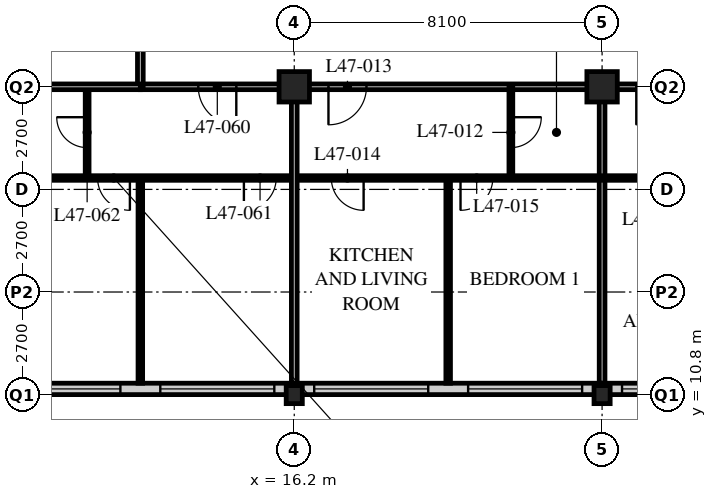
"""IFC4 building model, lengths in metres.
Left out: names, types, materials, properties, quantities, classifications, styles, units other than length and angle.
Written with IfcOpenShell. Run it as: python <this file> out.ifc"""

import sys

from ifc_helpers import new_model, si_unit, direction, frame, frame_2d, origin, origin_2d, place, context, subcontext, project, spatial, rectangle, hollow_rectangle, i_section, extrude, element, fill, save


model = new_model("IFC4")
c1 = context("Model", 3, precision=1e-05, world=origin(), true_north=direction((0.0, 1.0)))
c2 = subcontext(c1, "Body", "Model", "MODEL_VIEW")
j1 = project(units=[si_unit("LENGTHUNIT", "METRE"), si_unit("PLANEANGLEUNIT", "RADIAN")], contexts=[c1])
p1 = place(None, origin())
s1 = spatial("IfcSite", under=j1, at=p1, CompositionType="ELEMENT")
p2 = place(p1, origin())
s2 = spatial("IfcBuilding", under=s1, at=p2, CompositionType="ELEMENT")
p3 = place(p2, frame((0.0, 0.0, 184.8)))
s3 = spatial("IfcBuildingStorey", under=s2, at=p3, CompositionType="ELEMENT", Elevation=184.8)
p4 = place(p3, frame((16.2, 10.8, 0.0), z_axis=(0.0, 0.0, 1.0), x_axis=(1.0, 0.0, 0.0)))
e1 = element("IfcColumn", 1, at=p4, inside=s3, PredefinedType="COLUMN", context=c2, shape_type="SweptSolid", body=[
    extrude(i_section(OverallWidth=0.424, OverallDepth=0.475, WebThickness=0.048, FlangeThickness=0.077, FilletRadius=0.015, at=origin_2d()), origin(), (0.0, 0.0, 1.0), 3.6),
])
p5 = place(p3, frame((16.2, 18.9, 0.0), z_axis=(0.0, 0.0, 1.0), x_axis=(1.0, 0.0, 0.0)))
e2 = element("IfcColumn", 2, at=p5, inside=s3, PredefinedType="COLUMN", context=c2, shape_type="SweptSolid", body=[
    extrude(hollow_rectangle(XDim=0.8, YDim=0.8, WallThickness=0.08, at=origin_2d()), origin(), (0.0, 0.0, 1.0), 3.6),
])
p6 = place(p3, frame((24.3, 10.8, 0.0), z_axis=(0.0, 0.0, 1.0), x_axis=(1.0, 0.0, 0.0)))
e3 = element("IfcColumn", 3, at=p6, inside=s3, PredefinedType="COLUMN", context=c2, shape_type="SweptSolid", body=[
    extrude(i_section(OverallWidth=0.424, OverallDepth=0.475, WebThickness=0.048, FlangeThickness=0.077, FilletRadius=0.015, at=origin_2d()), origin(), (0.0, 0.0, 1.0), 3.6),
])
p7 = place(p3, frame((24.3, 18.9, 0.0), z_axis=(0.0, 0.0, 1.0), x_axis=(1.0, 0.0, 0.0)))
e4 = element("IfcColumn", 4, at=p7, inside=s3, PredefinedType="COLUMN", context=c2, shape_type="SweptSolid", body=[
    extrude(hollow_rectangle(XDim=0.8, YDim=0.8, WallThickness=0.08, at=origin_2d()), origin(), (0.0, 0.0, 1.0), 3.6),
])
p8 = place(p3, frame((8.4, 10.95, 0.0), z_axis=(0.0, 0.0, 1.0), x_axis=(1.0, 0.0, 0.0)))
e5 = element("IfcWall", 5, at=p8, inside=s3, PredefinedType="SOLIDWALL", context=c2, shape_type="SweptSolid", body=[
    extrude(rectangle(XDim=40.2, YDim=0.3, at=frame_2d((20.1, 0.0))), origin(), (0.0, 0.0, 1.0), 3.39),
])
p9 = place(p8, frame((0.225, 0.0, 0.6)))
e6 = element("IfcOpeningElement", 6, at=p9, cuts=e5, PredefinedType="OPENING", context=c2, shape_type="SweptSolid", body=[
    extrude(rectangle(XDim=3.0, YDim=2.4, at=frame_2d((1.5, 1.2))), frame((0.0, 0.16, 0.0), z_axis=(0.0, -1.0, 0.0), x_axis=(1.0, 0.0, 0.0)), (0.0, 0.0, 1.0), 0.32),
])
p10 = place(p8, frame((4.275, 0.0, 0.6)))
e7 = element("IfcOpeningElement", 7, at=p10, cuts=e5, PredefinedType="OPENING", context=c2, shape_type="SweptSolid", body=[
    extrude(rectangle(XDim=3.0, YDim=2.4, at=frame_2d((1.5, 1.2))), frame((0.0, 0.16, 0.0), z_axis=(0.0, -1.0, 0.0), x_axis=(1.0, 0.0, 0.0)), (0.0, 0.0, 1.0), 0.32),
])
p11 = place(p8, frame((8.325, 0.0, 0.6)))
e8 = element("IfcOpeningElement", 8, at=p11, cuts=e5, PredefinedType="OPENING", context=c2, shape_type="SweptSolid", body=[
    extrude(rectangle(XDim=3.0, YDim=2.4, at=frame_2d((1.5, 1.2))), frame((0.0, 0.16, 0.0), z_axis=(0.0, -1.0, 0.0), x_axis=(1.0, 0.0, 0.0)), (0.0, 0.0, 1.0), 0.32),
])
p12 = place(p8, frame((12.375, 0.0, 0.6)))
e9 = element("IfcOpeningElement", 9, at=p12, cuts=e5, PredefinedType="OPENING", context=c2, shape_type="SweptSolid", body=[
    extrude(rectangle(XDim=3.0, YDim=2.4, at=frame_2d((1.5, 1.2))), frame((0.0, 0.16, 0.0), z_axis=(0.0, -1.0, 0.0), x_axis=(1.0, 0.0, 0.0)), (0.0, 0.0, 1.0), 0.32),
])
p13 = place(p8, frame((16.425, 0.0, 0.6)))
e10 = element("IfcOpeningElement", 10, at=p13, cuts=e5, PredefinedType="OPENING", context=c2, shape_type="SweptSolid", body=[
    extrude(rectangle(XDim=3.0, YDim=2.4, at=frame_2d((1.5, 1.2))), frame((0.0, 0.16, 0.0), z_axis=(0.0, -1.0, 0.0), x_axis=(1.0, 0.0, 0.0)), (0.0, 0.0, 1.0), 0.32),
])
p14 = place(p8, frame((20.475, 0.0, 0.6)))
e11 = element("IfcOpeningElement", 11, at=p14, cuts=e5, PredefinedType="OPENING", context=c2, shape_type="SweptSolid", body=[
    extrude(rectangle(XDim=3.0, YDim=2.4, at=frame_2d((1.5, 1.2))), frame((0.0, 0.16, 0.0), z_axis=(0.0, -1.0, 0.0), x_axis=(1.0, 0.0, 0.0)), (0.0, 0.0, 1.0), 0.32),
])
p15 = place(p8, frame((24.525, 0.0, 0.6)))
e12 = element("IfcOpeningElement", 12, at=p15, cuts=e5, PredefinedType="OPENING", context=c2, shape_type="SweptSolid", body=[
    extrude(rectangle(XDim=3.0, YDim=2.4, at=frame_2d((1.5, 1.2))), frame((0.0, 0.16, 0.0), z_axis=(0.0, -1.0, 0.0), x_axis=(1.0, 0.0, 0.0)), (0.0, 0.0, 1.0), 0.32),
])
p16 = place(p8, frame((28.575, 0.0, 0.6)))
e13 = element("IfcOpeningElement", 13, at=p16, cuts=e5, PredefinedType="OPENING", context=c2, shape_type="SweptSolid", body=[
    extrude(rectangle(XDim=3.0, YDim=2.4, at=frame_2d((1.5, 1.2))), frame((0.0, 0.16, 0.0), z_axis=(0.0, -1.0, 0.0), x_axis=(1.0, 0.0, 0.0)), (0.0, 0.0, 1.0), 0.32),
])
p17 = place(p8, frame((32.625, 0.0, 0.6)))
e14 = element("IfcOpeningElement", 14, at=p17, cuts=e5, PredefinedType="OPENING", context=c2, shape_type="SweptSolid", body=[
    extrude(rectangle(XDim=3.0, YDim=2.4, at=frame_2d((1.5, 1.2))), frame((0.0, 0.16, 0.0), z_axis=(0.0, -1.0, 0.0), x_axis=(1.0, 0.0, 0.0)), (0.0, 0.0, 1.0), 0.32),
])
p18 = place(p8, frame((36.675, 0.0, 0.6)))
e15 = element("IfcOpeningElement", 15, at=p18, cuts=e5, PredefinedType="OPENING", context=c2, shape_type="SweptSolid", body=[
    extrude(rectangle(XDim=3.0, YDim=2.4, at=frame_2d((1.5, 1.2))), frame((0.0, 0.16, 0.0), z_axis=(0.0, -1.0, 0.0), x_axis=(1.0, 0.0, 0.0)), (0.0, 0.0, 1.0), 0.32),
])
p19 = place(p3, frame((12.15, 18.9, 0.0), z_axis=(0.0, 0.0, 1.0), x_axis=(1.0, 0.0, 0.0)))
e16 = element("IfcWall", 16, at=p19, inside=s3, PredefinedType="PARTITIONING", context=c2, shape_type="SweptSolid", body=[
    extrude(rectangle(XDim=32.4, YDim=0.15, at=frame_2d((16.2, 0.0))), origin(), (0.0, 0.0, 1.0), 2.778),
])
p20 = place(p19, frame((4.95, 0.0, 0.0)))
e17 = element("IfcOpeningElement", 17, at=p20, cuts=e16, PredefinedType="OPENING", context=c2, shape_type="SweptSolid", body=[
    extrude(rectangle(XDim=1.0, YDim=2.1, at=frame_2d((0.5, 1.05))), frame((0.0, 0.085, 0.0), z_axis=(0.0, -1.0, 0.0), x_axis=(1.0, 0.0, 0.0)), (0.0, 0.0, 1.0), 0.17),
])
p21 = place(p19, frame((13.05, 0.0, 0.0)))
e18 = element("IfcOpeningElement", 18, at=p21, cuts=e16, PredefinedType="OPENING", context=c2, shape_type="SweptSolid", body=[
    extrude(rectangle(XDim=1.0, YDim=2.1, at=frame_2d((0.5, 1.05))), frame((0.0, 0.085, 0.0), z_axis=(0.0, -1.0, 0.0), x_axis=(1.0, 0.0, 0.0)), (0.0, 0.0, 1.0), 0.17),
])
p22 = place(p19, frame((21.15, 0.0, 0.0)))
e19 = element("IfcOpeningElement", 19, at=p22, cuts=e16, PredefinedType="OPENING", context=c2, shape_type="SweptSolid", body=[
    extrude(rectangle(XDim=1.0, YDim=2.1, at=frame_2d((0.5, 1.05))), frame((0.0, 0.085, 0.0), z_axis=(0.0, -1.0, 0.0), x_axis=(1.0, 0.0, 0.0)), (0.0, 0.0, 1.0), 0.17),
])
p23 = place(p19, frame((1.525, 0.0, 0.0)))
e20 = element("IfcOpeningElement", 20, at=p23, cuts=e16, PredefinedType="OPENING", context=c2, shape_type="SweptSolid", body=[
    extrude(rectangle(XDim=1.0, YDim=2.1, at=frame_2d((0.5, 1.05))), frame((0.0, 0.085, 0.0), z_axis=(0.0, -1.0, 0.0), x_axis=(1.0, 0.0, 0.0)), (0.0, 0.0, 1.0), 0.17),
])
p24 = place(p19, frame((29.875, 0.0, 0.0)))
e21 = element("IfcOpeningElement", 21, at=p24, cuts=e16, PredefinedType="OPENING", context=c2, shape_type="SweptSolid", body=[
    extrude(rectangle(XDim=1.0, YDim=2.1, at=frame_2d((0.5, 1.05))), frame((0.0, 0.085, 0.0), z_axis=(0.0, -1.0, 0.0), x_axis=(1.0, 0.0, 0.0)), (0.0, 0.0, 1.0), 0.17),
])
p25 = place(p3, frame((12.15, 18.9, 0.0), z_axis=(0.0, 0.0, 1.0), x_axis=(0.0, 1.0, 0.0)))
e22 = element("IfcWall", 22, at=p25, inside=s3, PredefinedType="PARTITIONING", context=c2, shape_type="SweptSolid", body=[
    extrude(rectangle(XDim=28.35, YDim=0.15, at=frame_2d((14.175, 0.0))), origin(), (0.0, 0.0, 1.0), 3.39),
])
p26 = place(p25, frame((2.35, 0.0, 0.0)))
e23 = element("IfcOpeningElement", 23, at=p26, cuts=e22, PredefinedType="OPENING", context=c2, shape_type="SweptSolid", body=[
    extrude(rectangle(XDim=1.0, YDim=2.1, at=frame_2d((0.5, 1.05))), frame((0.0, 0.085, 0.0), z_axis=(0.0, -1.0, 0.0), x_axis=(1.0, 0.0, 0.0)), (0.0, 0.0, 1.0), 0.17),
])
p27 = place(p25, frame((6.4, 0.0, 0.0)))
e24 = element("IfcOpeningElement", 24, at=p27, cuts=e22, PredefinedType="OPENING", context=c2, shape_type="SweptSolid", body=[
    extrude(rectangle(XDim=1.0, YDim=2.1, at=frame_2d((0.5, 1.05))), frame((0.0, 0.085, 0.0), z_axis=(0.0, -1.0, 0.0), x_axis=(1.0, 0.0, 0.0)), (0.0, 0.0, 1.0), 0.17),
])
p28 = place(p25, frame((8.5, 0.0, 0.0)))
e25 = element("IfcOpeningElement", 25, at=p28, cuts=e22, PredefinedType="OPENING", context=c2, shape_type="SweptSolid", body=[
    extrude(rectangle(XDim=1.0, YDim=2.1, at=frame_2d((0.5, 1.05))), frame((0.0, 0.085, 0.0), z_axis=(0.0, -1.0, 0.0), x_axis=(1.0, 0.0, 0.0)), (0.0, 0.0, 1.0), 0.17),
])
p29 = place(p25, frame((16.6, 0.0, 0.0)))
e26 = element("IfcOpeningElement", 26, at=p29, cuts=e22, PredefinedType="OPENING", context=c2, shape_type="SweptSolid", body=[
    extrude(rectangle(XDim=1.0, YDim=2.1, at=frame_2d((0.5, 1.05))), frame((0.0, 0.085, 0.0), z_axis=(0.0, -1.0, 0.0), x_axis=(1.0, 0.0, 0.0)), (0.0, 0.0, 1.0), 0.17),
])
p30 = place(p25, frame((26.65, 0.0, 0.0)))
e27 = element("IfcOpeningElement", 27, at=p30, cuts=e22, PredefinedType="OPENING", context=c2, shape_type="SweptSolid", body=[
    extrude(rectangle(XDim=1.0, YDim=2.1, at=frame_2d((0.5, 1.05))), frame((0.0, 0.085, 0.0), z_axis=(0.0, -1.0, 0.0), x_axis=(1.0, 0.0, 0.0)), (0.0, 0.0, 1.0), 0.17),
])
p31 = place(p3, frame((21.9, 18.9, 0.0), z_axis=(0.0, 0.0, 1.0), x_axis=(0.0, -1.0, 0.0)))
e28 = element("IfcWall", 28, at=p31, inside=s3, PredefinedType="PARTITIONING", context=c2, shape_type="SweptSolid", body=[
    extrude(rectangle(XDim=2.4, YDim=0.1, at=frame_2d((1.2, 0.0))), origin(), (0.0, 0.0, 1.0), 3.39),
])
p32 = place(p31, frame((0.8, 0.0, 0.0)))
e29 = element("IfcOpeningElement", 29, at=p32, cuts=e28, PredefinedType="OPENING", context=c2, shape_type="SweptSolid", body=[
    extrude(rectangle(XDim=0.8, YDim=2.1, at=frame_2d((0.4, 1.05))), frame((0.0, 0.06, 0.0), z_axis=(0.0, -1.0, 0.0), x_axis=(1.0, 0.0, 0.0)), (0.0, 0.0, 1.0), 0.12),
])
p33 = place(p3, frame((20.25, 16.5, 0.0), z_axis=(0.0, 0.0, 1.0), x_axis=(0.0, -1.0, 0.0)))
e30 = element("IfcWall", 30, at=p33, inside=s3, PredefinedType="PARTITIONING", context=c2, shape_type="SweptSolid", body=[
    extrude(rectangle(XDim=5.4, YDim=0.12, at=frame_2d((2.7, 0.0))), origin(), (0.0, 0.0, 1.0), 3.39),
])
p34 = place(p3, frame((24.3, 18.9, 0.0), z_axis=(0.0, 0.0, 1.0), x_axis=(0.0, -1.0, 0.0)))
e31 = element("IfcWall", 31, at=p34, inside=s3, PredefinedType="PARTITIONING", context=c2, shape_type="SweptSolid", body=[
    extrude(rectangle(XDim=7.8, YDim=0.15, at=frame_2d((3.9, 0.0))), origin(), (0.0, 0.0, 1.0), 2.778),
])
p35 = place(p3, frame((10.75, 18.9, 0.0), z_axis=(0.0, 0.0, 1.0), x_axis=(0.0, -1.0, 0.0)))
e32 = element("IfcWall", 32, at=p35, inside=s3, PredefinedType="PARTITIONING", context=c2, shape_type="SweptSolid", body=[
    extrude(rectangle(XDim=2.4, YDim=0.1, at=frame_2d((1.2, 0.0))), origin(), (0.0, 0.0, 1.0), 3.39),
])
p36 = place(p35, frame((0.8, 0.0, 0.0)))
e33 = element("IfcOpeningElement", 33, at=p36, cuts=e32, PredefinedType="OPENING", context=c2, shape_type="SweptSolid", body=[
    extrude(rectangle(XDim=0.8, YDim=2.1, at=frame_2d((0.4, 1.05))), frame((0.0, 0.06, 0.0), z_axis=(0.0, -1.0, 0.0), x_axis=(1.0, 0.0, 0.0)), (0.0, 0.0, 1.0), 0.12),
])
p37 = place(p3, frame((8.15, 16.5, 0.0), z_axis=(0.0, 0.0, 1.0), x_axis=(1.0, 0.0, 0.0)))
e34 = element("IfcWall", 34, at=p37, inside=s3, PredefinedType="PARTITIONING", context=c2, shape_type="SweptSolid", body=[
    extrude(rectangle(XDim=40.4, YDim=0.12, at=frame_2d((20.2, 0.0))), origin(), (0.0, 0.0, 1.0), 3.39),
])
p38 = place(p37, frame((9.025, 0.0, 0.0)))
e35 = element("IfcOpeningElement", 35, at=p38, cuts=e34, PredefinedType="OPENING", context=c2, shape_type="SweptSolid", body=[
    extrude(rectangle(XDim=0.85, YDim=2.1, at=frame_2d((0.425, 1.05))), frame((0.0, 0.07, 0.0), z_axis=(0.0, -1.0, 0.0), x_axis=(1.0, 0.0, 0.0)), (0.0, 0.0, 1.0), 0.14),
])
p39 = place(p37, frame((12.425, 0.0, 0.0)))
e36 = element("IfcOpeningElement", 36, at=p39, cuts=e34, PredefinedType="OPENING", context=c2, shape_type="SweptSolid", body=[
    extrude(rectangle(XDim=0.85, YDim=2.1, at=frame_2d((0.425, 1.05))), frame((0.0, 0.07, 0.0), z_axis=(0.0, -1.0, 0.0), x_axis=(1.0, 0.0, 0.0)), (0.0, 0.0, 1.0), 0.14),
])
p40 = place(p37, frame((17.125, 0.0, 0.0)))
e37 = element("IfcOpeningElement", 37, at=p40, cuts=e34, PredefinedType="OPENING", context=c2, shape_type="SweptSolid", body=[
    extrude(rectangle(XDim=0.85, YDim=2.1, at=frame_2d((0.425, 1.05))), frame((0.0, 0.07, 0.0), z_axis=(0.0, -1.0, 0.0), x_axis=(1.0, 0.0, 0.0)), (0.0, 0.0, 1.0), 0.14),
])
p41 = place(p37, frame((20.525, 0.0, 0.0)))
e38 = element("IfcOpeningElement", 38, at=p41, cuts=e34, PredefinedType="OPENING", context=c2, shape_type="SweptSolid", body=[
    extrude(rectangle(XDim=0.85, YDim=2.1, at=frame_2d((0.425, 1.05))), frame((0.0, 0.07, 0.0), z_axis=(0.0, -1.0, 0.0), x_axis=(1.0, 0.0, 0.0)), (0.0, 0.0, 1.0), 0.14),
])
p42 = place(p37, frame((25.225, 0.0, 0.0)))
e39 = element("IfcOpeningElement", 39, at=p42, cuts=e34, PredefinedType="OPENING", context=c2, shape_type="SweptSolid", body=[
    extrude(rectangle(XDim=0.85, YDim=2.1, at=frame_2d((0.425, 1.05))), frame((0.0, 0.07, 0.0), z_axis=(0.0, -1.0, 0.0), x_axis=(1.0, 0.0, 0.0)), (0.0, 0.0, 1.0), 0.14),
])
p43 = place(p37, frame((28.625, 0.0, 0.0)))
e40 = element("IfcOpeningElement", 40, at=p43, cuts=e34, PredefinedType="OPENING", context=c2, shape_type="SweptSolid", body=[
    extrude(rectangle(XDim=0.85, YDim=2.1, at=frame_2d((0.425, 1.05))), frame((0.0, 0.07, 0.0), z_axis=(0.0, -1.0, 0.0), x_axis=(1.0, 0.0, 0.0)), (0.0, 0.0, 1.0), 0.14),
])
p44 = place(p37, frame((6.725, 0.0, 0.0)))
e41 = element("IfcOpeningElement", 41, at=p44, cuts=e34, PredefinedType="OPENING", context=c2, shape_type="SweptSolid", body=[
    extrude(rectangle(XDim=0.85, YDim=2.1, at=frame_2d((0.425, 1.05))), frame((0.0, 0.07, 0.0), z_axis=(0.0, -1.0, 0.0), x_axis=(1.0, 0.0, 0.0)), (0.0, 0.0, 1.0), 0.14),
])
p45 = place(p37, frame((2.875, 0.0, 0.0)))
e42 = element("IfcOpeningElement", 42, at=p45, cuts=e34, PredefinedType="OPENING", context=c2, shape_type="SweptSolid", body=[
    extrude(rectangle(XDim=0.85, YDim=2.1, at=frame_2d((0.425, 1.05))), frame((0.0, 0.07, 0.0), z_axis=(0.0, -1.0, 0.0), x_axis=(1.0, 0.0, 0.0)), (0.0, 0.0, 1.0), 0.14),
])
p46 = place(p37, frame((32.825, 0.0, 0.0)))
e43 = element("IfcOpeningElement", 43, at=p46, cuts=e34, PredefinedType="OPENING", context=c2, shape_type="SweptSolid", body=[
    extrude(rectangle(XDim=0.85, YDim=2.1, at=frame_2d((0.425, 1.05))), frame((0.0, 0.07, 0.0), z_axis=(0.0, -1.0, 0.0), x_axis=(1.0, 0.0, 0.0)), (0.0, 0.0, 1.0), 0.14),
])
p47 = place(p37, frame((36.675, 0.0, 0.0)))
e44 = element("IfcOpeningElement", 44, at=p47, cuts=e34, PredefinedType="OPENING", context=c2, shape_type="SweptSolid", body=[
    extrude(rectangle(XDim=0.85, YDim=2.1, at=frame_2d((0.425, 1.05))), frame((0.0, 0.07, 0.0), z_axis=(0.0, -1.0, 0.0), x_axis=(1.0, 0.0, 0.0)), (0.0, 0.0, 1.0), 0.14),
])
p48 = place(p3, frame((12.15, 16.5, 0.0), z_axis=(0.0, 0.0, 1.0), x_axis=(0.0, -1.0, 0.0)))
e45 = element("IfcWall", 45, at=p48, inside=s3, PredefinedType="PARTITIONING", context=c2, shape_type="SweptSolid", body=[
    extrude(rectangle(XDim=5.4, YDim=0.12, at=frame_2d((2.7, 0.0))), origin(), (0.0, 0.0, 1.0), 3.39),
])
for number, where, z_axis, x_axis in (
    (46, (4.35, 18.9, 0.0), (0.0, 0.0, 1.0), (1.0, 0.0, 0.0)),
    (47, (16.2, 18.9, 0.0), (0.0, 0.0, 1.0), (0.0, -1.0, 0.0)),
):
    element("IfcWall", number, at=place(p3, frame(where, z_axis=z_axis, x_axis=x_axis)), inside=s3, PredefinedType="PARTITIONING", context=c2, shape_type="SweptSolid", body=[
        extrude(rectangle(XDim=7.8, YDim=0.15, at=frame_2d((3.9, 0.0))), origin(), (0.0, 0.0, 1.0), 2.778),
    ])
p49 = place(p9, origin())
e48 = element("IfcWindow", 48, at=p49, inside=s3, PartitioningType="SINGLE_PANEL", PredefinedType="WINDOW", context=c2, shape_type="SweptSolid", body=[
    extrude(rectangle(XDim=3.0, YDim=2.4, at=frame_2d((1.5, 1.2))), frame((0.0, 0.03, 0.0), z_axis=(0.0, -1.0, 0.0), x_axis=(1.0, 0.0, 0.0)), (0.0, 0.0, 1.0), 0.06),
])
fill(e6, e48)
p50 = place(p10, origin())
e49 = element("IfcWindow", 49, at=p50, inside=s3, PartitioningType="SINGLE_PANEL", PredefinedType="WINDOW", context=c2, shape_type="SweptSolid", body=[
    extrude(rectangle(XDim=3.0, YDim=2.4, at=frame_2d((1.5, 1.2))), frame((0.0, 0.03, 0.0), z_axis=(0.0, -1.0, 0.0), x_axis=(1.0, 0.0, 0.0)), (0.0, 0.0, 1.0), 0.06),
])
fill(e7, e49)
p51 = place(p11, origin())
e50 = element("IfcWindow", 50, at=p51, inside=s3, PartitioningType="SINGLE_PANEL", PredefinedType="WINDOW", context=c2, shape_type="SweptSolid", body=[
    extrude(rectangle(XDim=3.0, YDim=2.4, at=frame_2d((1.5, 1.2))), frame((0.0, 0.03, 0.0), z_axis=(0.0, -1.0, 0.0), x_axis=(1.0, 0.0, 0.0)), (0.0, 0.0, 1.0), 0.06),
])
fill(e8, e50)
p52 = place(p12, origin())
e51 = element("IfcWindow", 51, at=p52, inside=s3, PartitioningType="SINGLE_PANEL", PredefinedType="WINDOW", context=c2, shape_type="SweptSolid", body=[
    extrude(rectangle(XDim=3.0, YDim=2.4, at=frame_2d((1.5, 1.2))), frame((0.0, 0.03, 0.0), z_axis=(0.0, -1.0, 0.0), x_axis=(1.0, 0.0, 0.0)), (0.0, 0.0, 1.0), 0.06),
])
fill(e9, e51)
p53 = place(p13, origin())
e52 = element("IfcWindow", 52, at=p53, inside=s3, PartitioningType="SINGLE_PANEL", PredefinedType="WINDOW", context=c2, shape_type="SweptSolid", body=[
    extrude(rectangle(XDim=3.0, YDim=2.4, at=frame_2d((1.5, 1.2))), frame((0.0, 0.03, 0.0), z_axis=(0.0, -1.0, 0.0), x_axis=(1.0, 0.0, 0.0)), (0.0, 0.0, 1.0), 0.06),
])
fill(e10, e52)
p54 = place(p32, origin())
e53 = element("IfcDoor", 53, at=p54, inside=s3, OperationType="SINGLE_SWING_LEFT", PredefinedType="DOOR", context=c2, shape_type="SweptSolid", body=[
    extrude(rectangle(XDim=0.8, YDim=2.1, at=frame_2d((0.4, 1.05))), frame((0.0, 0.025, 0.0), z_axis=(0.0, -1.0, 0.0), x_axis=(1.0, 0.0, 0.0)), (0.0, 0.0, 1.0), 0.05),
])
fill(e29, e53)
p55 = place(p20, origin())
e54 = element("IfcDoor", 54, at=p55, inside=s3, OperationType="SINGLE_SWING_RIGHT", PredefinedType="DOOR", context=c2, shape_type="SweptSolid", body=[
    extrude(rectangle(XDim=1.0, YDim=2.1, at=frame_2d((0.5, 1.05))), frame((0.0, 0.025, 0.0), z_axis=(0.0, -1.0, 0.0), x_axis=(1.0, 0.0, 0.0)), (0.0, 0.0, 1.0), 0.05),
])
fill(e17, e54)
p56 = place(p38, origin())
e55 = element("IfcDoor", 55, at=p56, inside=s3, OperationType="SINGLE_SWING_LEFT", PredefinedType="DOOR", context=c2, shape_type="SweptSolid", body=[
    extrude(rectangle(XDim=0.85, YDim=2.1, at=frame_2d((0.425, 1.05))), frame((0.0, 0.025, 0.0), z_axis=(0.0, -1.0, 0.0), x_axis=(1.0, 0.0, 0.0)), (0.0, 0.0, 1.0), 0.05),
])
fill(e35, e55)
p57 = place(p39, origin())
e56 = element("IfcDoor", 56, at=p57, inside=s3, OperationType="SINGLE_SWING_RIGHT", PredefinedType="DOOR", context=c2, shape_type="SweptSolid", body=[
    extrude(rectangle(XDim=0.85, YDim=2.1, at=frame_2d((0.425, 1.05))), frame((0.0, 0.025, 0.0), z_axis=(0.0, -1.0, 0.0), x_axis=(1.0, 0.0, 0.0)), (0.0, 0.0, 1.0), 0.05),
])
fill(e36, e56)
p58 = place(p21, origin())
e57 = element("IfcDoor", 57, at=p58, inside=s3, OperationType="SINGLE_SWING_RIGHT", PredefinedType="DOOR", context=c2, shape_type="SweptSolid", body=[
    extrude(rectangle(XDim=1.0, YDim=2.1, at=frame_2d((0.5, 1.05))), frame((0.0, 0.025, 0.0), z_axis=(0.0, -1.0, 0.0), x_axis=(1.0, 0.0, 0.0)), (0.0, 0.0, 1.0), 0.05),
])
fill(e18, e57)
p59 = place(p23, origin())
e58 = element("IfcDoor", 58, at=p59, inside=s3, OperationType="SINGLE_SWING_LEFT", PredefinedType="DOOR", context=c2, shape_type="SweptSolid", body=[
    extrude(rectangle(XDim=1.0, YDim=2.1, at=frame_2d((0.5, 1.05))), frame((0.0, 0.025, 0.0), z_axis=(0.0, -1.0, 0.0), x_axis=(1.0, 0.0, 0.0)), (0.0, 0.0, 1.0), 0.05),
])
fill(e20, e58)
p60 = place(p44, origin())
e59 = element("IfcDoor", 59, at=p60, inside=s3, OperationType="SINGLE_SWING_RIGHT", PredefinedType="DOOR", context=c2, shape_type="SweptSolid", body=[
    extrude(rectangle(XDim=0.85, YDim=2.1, at=frame_2d((0.425, 1.05))), frame((0.0, 0.025, 0.0), z_axis=(0.0, -1.0, 0.0), x_axis=(1.0, 0.0, 0.0)), (0.0, 0.0, 1.0), 0.05),
])
fill(e41, e59)
p61 = place(p36, origin())
e60 = element("IfcDoor", 60, at=p61, inside=s3, OperationType="SINGLE_SWING_RIGHT", PredefinedType="DOOR", context=c2, shape_type="SweptSolid", body=[
    extrude(rectangle(XDim=0.8, YDim=2.1, at=frame_2d((0.4, 1.05))), frame((0.0, 0.025, 0.0), z_axis=(0.0, -1.0, 0.0), x_axis=(1.0, 0.0, 0.0)), (0.0, 0.0, 1.0), 0.05),
])
fill(e33, e60)
p62 = place(p45, origin())
e61 = element("IfcDoor", 61, at=p62, inside=s3, OperationType="SINGLE_SWING_LEFT", PredefinedType="DOOR", context=c2, shape_type="SweptSolid", body=[
    extrude(rectangle(XDim=0.85, YDim=2.1, at=frame_2d((0.425, 1.05))), frame((0.0, 0.025, 0.0), z_axis=(0.0, -1.0, 0.0), x_axis=(1.0, 0.0, 0.0)), (0.0, 0.0, 1.0), 0.05),
])
fill(e42, e61)
save(model, sys.argv[1])
